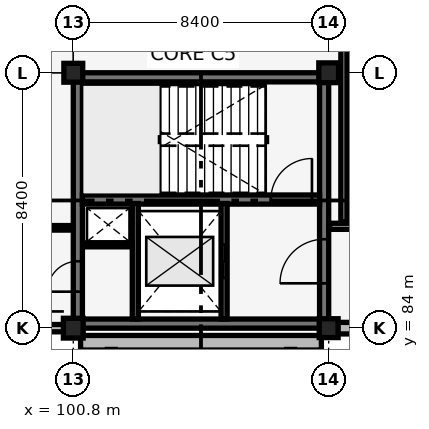
"""IFC4 building model, lengths in metres.
Left out: names, types, materials, properties, quantities, classifications, styles, units other than length and angle.
Written with IfcOpenShell. Run it as: python <this file> out.ifc"""

import sys

from ifc_helpers import new_model, si_unit, direction, frame, frame_2d, origin, origin_2d, place, context, subcontext, project, spatial, rectangle, extrude, element, fill, save


model = new_model("IFC4")
c1 = context("Model", 3, precision=1e-05, world=origin(), true_north=direction((0.0, 1.0)))
c2 = subcontext(c1, "Body", "Model", "MODEL_VIEW")
j1 = project(units=[si_unit("LENGTHUNIT", "METRE"), si_unit("PLANEANGLEUNIT", "RADIAN")], contexts=[c1])
p1 = place(None, origin())
s1 = spatial("IfcSite", under=j1, at=p1, CompositionType="ELEMENT")
p2 = place(p1, origin())
s2 = spatial("IfcBuilding", under=s1, at=p2, CompositionType="ELEMENT")
p3 = place(p2, frame((0.0, 0.0, 5.44)))
s3 = spatial("IfcBuildingStorey", under=s2, at=p3, CompositionType="ELEMENT", Elevation=5.44)
for number, where, z_axis, x_axis in (
    (1, (100.95, 84.15, 0.0), (0.0, 0.0, 1.0), (1.0, 0.0, 0.0)),
    (2, (100.95, 92.25, 0.0), (0.0, 0.0, 1.0), (1.0, 0.0, 0.0)),
):
    element("IfcWall", number, at=place(p3, frame(where, z_axis=z_axis, x_axis=x_axis)), inside=s3, PredefinedType="SHEAR", context=c2, shape_type="SweptSolid", body=[
        extrude(rectangle(XDim=8.1, YDim=0.3, at=frame_2d((4.05, 0.0))), origin(), (0.0, 0.0, 1.0), 4.12),
    ])
p4 = place(p3, frame((100.95, 84.15, 0.0), z_axis=(0.0, 0.0, 1.0), x_axis=(0.0, 1.0, 0.0)))
e3 = element("IfcWall", 3, at=p4, inside=s3, PredefinedType="SHEAR", context=c2, shape_type="SweptSolid", body=[
    extrude(rectangle(XDim=8.1, YDim=0.3, at=frame_2d((4.05, 0.0))), origin(), (0.0, 0.0, 1.0), 4.12),
])
p5 = place(p4, frame((1.05, 0.0, 0.0)))
e4 = element("IfcOpeningElement", 4, at=p5, cuts=e3, PredefinedType="OPENING", context=c2, shape_type="SweptSolid", body=[
    extrude(rectangle(XDim=1.0, YDim=2.15, at=frame_2d((0.5, 1.075))), frame((0.0, 0.16, 0.0), z_axis=(0.0, -1.0, 0.0), x_axis=(1.0, 0.0, 0.0)), (0.0, 0.0, 1.0), 0.32),
])
p6 = place(p3, frame((109.05, 84.15, 0.0), z_axis=(0.0, 0.0, 1.0), x_axis=(0.0, 1.0, 0.0)))
e5 = element("IfcWall", 5, at=p6, inside=s3, PredefinedType="SHEAR", context=c2, shape_type="SweptSolid", body=[
    extrude(rectangle(XDim=8.1, YDim=0.3, at=frame_2d((4.05, 0.0))), origin(), (0.0, 0.0, 1.0), 4.12),
])
p7 = place(p6, frame((1.325, 0.0, 0.0)))
e6 = element("IfcOpeningElement", 6, at=p7, cuts=e5, PredefinedType="OPENING", context=c2, shape_type="SweptSolid", body=[
    extrude(rectangle(XDim=1.45, YDim=2.15, at=frame_2d((0.725, 1.075))), frame((0.0, 0.16, 0.0), z_axis=(0.0, -1.0, 0.0), x_axis=(1.0, 0.0, 0.0)), (0.0, 0.0, 1.0), 0.32),
])
p8 = place(p3, frame((101.1, 88.23, 0.0), z_axis=(0.0, 0.0, 1.0), x_axis=(1.0, 0.0, 0.0)))
e7 = element("IfcWall", 7, at=p8, inside=s3, PredefinedType="SHEAR", context=c2, shape_type="SweptSolid", body=[
    extrude(rectangle(XDim=7.8, YDim=0.3, at=frame_2d((3.9, 0.0))), origin(), (0.0, 0.0, 1.0), 4.12),
])
p9 = place(p8, frame((6.2, 0.0, 0.0)))
e8 = element("IfcOpeningElement", 8, at=p9, cuts=e7, PredefinedType="OPENING", context=c2, shape_type="SweptSolid", body=[
    extrude(rectangle(XDim=1.35, YDim=2.15, at=frame_2d((0.675, 1.075))), frame((0.0, 0.16, 0.0), z_axis=(0.0, -1.0, 0.0), x_axis=(1.0, 0.0, 0.0)), (0.0, 0.0, 1.0), 0.32),
])
p10 = place(p3, frame((100.8, 84.0, 0.0), z_axis=(0.0, 0.0, 1.0), x_axis=(1.0, 0.0, 0.0)))
e9 = element("IfcColumn", 9, at=p10, inside=s3, PredefinedType="COLUMN", context=c2, shape_type="SweptSolid", body=[
    extrude(rectangle(XDim=0.65, YDim=0.65, at=origin_2d()), origin(), (0.0, 0.0, 1.0), 4.12),
])
for number, where, z_axis, x_axis in (
    (10, (100.8, 92.4, 0.0), (0.0, 0.0, 1.0), (1.0, 0.0, 0.0)),
    (11, (109.2, 84.0, 0.0), (0.0, 0.0, 1.0), (1.0, 0.0, 0.0)),
):
    element("IfcColumn", number, at=place(p3, frame(where, z_axis=z_axis, x_axis=x_axis)), inside=s3, PredefinedType="COLUMN", context=c2, shape_type="SweptSolid", body=[
        extrude(rectangle(XDim=0.62, YDim=0.62, at=origin_2d()), origin(), (0.0, 0.0, 1.0), 4.12),
    ])
p11 = place(p3, frame((109.2, 92.4, 0.0), z_axis=(0.0, 0.0, 1.0), x_axis=(1.0, 0.0, 0.0)))
e12 = element("IfcColumn", 12, at=p11, inside=s3, PredefinedType="COLUMN", context=c2, shape_type="SweptSolid", body=[
    extrude(rectangle(XDim=0.65, YDim=0.65, at=origin_2d()), origin(), (0.0, 0.0, 1.0), 4.12),
])
p12 = place(p3, frame((92.595, 84.0, 0.0), z_axis=(0.0, 0.0, 1.0), x_axis=(1.0, 0.0, 0.0)))
e13 = element("IfcWall", 13, at=p12, inside=s3, PredefinedType="SOLIDWALL", context=c2, shape_type="SweptSolid", body=[
    extrude(rectangle(XDim=7.895, YDim=0.24, at=frame_2d((3.948, 0.0))), origin(), (0.0, 0.0, 1.0), 3.38),
])
p13 = place(p12, frame((0.81, 0.0, 0.35)))
e14 = element("IfcOpeningElement", 14, at=p13, cuts=e13, PredefinedType="OPENING", context=c2, shape_type="SweptSolid", body=[
    extrude(rectangle(XDim=0.44, YDim=1.25, at=frame_2d((0.22, 0.625))), frame((0.0, 0.13, 0.0), z_axis=(0.0, -1.0, 0.0), x_axis=(1.0, 0.0, 0.0)), (0.0, 0.0, 1.0), 0.26),
])
p14 = place(p12, frame((2.269, 0.0, 0.35)))
e15 = element("IfcOpeningElement", 15, at=p14, cuts=e13, PredefinedType="OPENING", context=c2, shape_type="SweptSolid", body=[
    extrude(rectangle(XDim=0.44, YDim=1.25, at=frame_2d((0.22, 0.625))), frame((0.0, 0.13, 0.0), z_axis=(0.0, -1.0, 0.0), x_axis=(1.0, 0.0, 0.0)), (0.0, 0.0, 1.0), 0.26),
])
p15 = place(p12, frame((3.728, 0.0, 0.35)))
e16 = element("IfcOpeningElement", 16, at=p15, cuts=e13, PredefinedType="OPENING", context=c2, shape_type="SweptSolid", body=[
    extrude(rectangle(XDim=0.44, YDim=1.25, at=frame_2d((0.22, 0.625))), frame((0.0, 0.13, 0.0), z_axis=(0.0, -1.0, 0.0), x_axis=(1.0, 0.0, 0.0)), (0.0, 0.0, 1.0), 0.26),
])
p16 = place(p12, frame((5.187, 0.0, 0.35)))
e17 = element("IfcOpeningElement", 17, at=p16, cuts=e13, PredefinedType="OPENING", context=c2, shape_type="SweptSolid", body=[
    extrude(rectangle(XDim=0.44, YDim=1.25, at=frame_2d((0.22, 0.625))), frame((0.0, 0.13, 0.0), z_axis=(0.0, -1.0, 0.0), x_axis=(1.0, 0.0, 0.0)), (0.0, 0.0, 1.0), 0.26),
])
p17 = place(p12, frame((6.646, 0.0, 0.35)))
e18 = element("IfcOpeningElement", 18, at=p17, cuts=e13, PredefinedType="OPENING", context=c2, shape_type="SweptSolid", body=[
    extrude(rectangle(XDim=0.44, YDim=1.25, at=frame_2d((0.22, 0.625))), frame((0.0, 0.13, 0.0), z_axis=(0.0, -1.0, 0.0), x_axis=(1.0, 0.0, 0.0)), (0.0, 0.0, 1.0), 0.26),
])
p18 = place(p12, frame((0.81, 0.0, 1.8)))
e19 = element("IfcOpeningElement", 19, at=p18, cuts=e13, PredefinedType="OPENING", context=c2, shape_type="SweptSolid", body=[
    extrude(rectangle(XDim=0.44, YDim=1.25, at=frame_2d((0.22, 0.625))), frame((0.0, 0.13, 0.0), z_axis=(0.0, -1.0, 0.0), x_axis=(1.0, 0.0, 0.0)), (0.0, 0.0, 1.0), 0.26),
])
p19 = place(p12, frame((2.269, 0.0, 1.8)))
e20 = element("IfcOpeningElement", 20, at=p19, cuts=e13, PredefinedType="OPENING", context=c2, shape_type="SweptSolid", body=[
    extrude(rectangle(XDim=0.44, YDim=1.25, at=frame_2d((0.22, 0.625))), frame((0.0, 0.13, 0.0), z_axis=(0.0, -1.0, 0.0), x_axis=(1.0, 0.0, 0.0)), (0.0, 0.0, 1.0), 0.26),
])
p20 = place(p12, frame((3.728, 0.0, 1.8)))
e21 = element("IfcOpeningElement", 21, at=p20, cuts=e13, PredefinedType="OPENING", context=c2, shape_type="SweptSolid", body=[
    extrude(rectangle(XDim=0.44, YDim=1.25, at=frame_2d((0.22, 0.625))), frame((0.0, 0.13, 0.0), z_axis=(0.0, -1.0, 0.0), x_axis=(1.0, 0.0, 0.0)), (0.0, 0.0, 1.0), 0.26),
])
p21 = place(p12, frame((5.187, 0.0, 1.8)))
e22 = element("IfcOpeningElement", 22, at=p21, cuts=e13, PredefinedType="OPENING", context=c2, shape_type="SweptSolid", body=[
    extrude(rectangle(XDim=0.44, YDim=1.25, at=frame_2d((0.22, 0.625))), frame((0.0, 0.13, 0.0), z_axis=(0.0, -1.0, 0.0), x_axis=(1.0, 0.0, 0.0)), (0.0, 0.0, 1.0), 0.26),
])
p22 = place(p12, frame((6.646, 0.0, 1.8)))
e23 = element("IfcOpeningElement", 23, at=p22, cuts=e13, PredefinedType="OPENING", context=c2, shape_type="SweptSolid", body=[
    extrude(rectangle(XDim=0.44, YDim=1.25, at=frame_2d((0.22, 0.625))), frame((0.0, 0.13, 0.0), z_axis=(0.0, -1.0, 0.0), x_axis=(1.0, 0.0, 0.0)), (0.0, 0.0, 1.0), 0.26),
])
p23 = place(p3, frame((101.04, 83.52, 0.0), z_axis=(0.0, 0.0, 1.0), x_axis=(1.0, 0.0, 0.0)))
e24 = element("IfcWall", 24, at=p23, inside=s3, PredefinedType="SOLIDWALL", context=c2, shape_type="SweptSolid", body=[
    extrude(rectangle(XDim=7.92, YDim=0.48, at=frame_2d((3.96, 0.0))), origin(), (0.0, 0.0, 1.0), 4.42),
])
p24 = place(p3, frame((109.495, 84.0, 0.0), z_axis=(0.0, 0.0, 1.0), x_axis=(1.0, 0.0, 0.0)))
e25 = element("IfcWall", 25, at=p24, inside=s3, PredefinedType="SOLIDWALL", context=c2, shape_type="SweptSolid", body=[
    extrude(rectangle(XDim=7.795, YDim=0.38, at=frame_2d((3.897, 0.0))), origin(), (0.0, 0.0, 1.0), 3.38),
])
p25 = place(p24, frame((1.071, 0.0, 0.7)))
e26 = element("IfcOpeningElement", 26, at=p25, cuts=e25, PredefinedType="OPENING", context=c2, shape_type="SweptSolid", body=[
    extrude(rectangle(XDim=0.82, YDim=2.4, at=frame_2d((0.41, 1.2))), frame((0.0, 0.2, 0.0), z_axis=(0.0, -1.0, 0.0), x_axis=(1.0, 0.0, 0.0)), (0.0, 0.0, 1.0), 0.4),
])
p26 = place(p24, frame((2.63, 0.0, 0.7)))
e27 = element("IfcOpeningElement", 27, at=p26, cuts=e25, PredefinedType="OPENING", context=c2, shape_type="SweptSolid", body=[
    extrude(rectangle(XDim=0.82, YDim=2.4, at=frame_2d((0.41, 1.2))), frame((0.0, 0.2, 0.0), z_axis=(0.0, -1.0, 0.0), x_axis=(1.0, 0.0, 0.0)), (0.0, 0.0, 1.0), 0.4),
])
p27 = place(p24, frame((4.345, 0.0, 0.7)))
e28 = element("IfcOpeningElement", 28, at=p27, cuts=e25, PredefinedType="OPENING", context=c2, shape_type="SweptSolid", body=[
    extrude(rectangle(XDim=0.82, YDim=2.4, at=frame_2d((0.41, 1.2))), frame((0.0, 0.2, 0.0), z_axis=(0.0, -1.0, 0.0), x_axis=(1.0, 0.0, 0.0)), (0.0, 0.0, 1.0), 0.4),
])
p28 = place(p24, frame((5.904, 0.0, 0.7)))
e29 = element("IfcOpeningElement", 29, at=p28, cuts=e25, PredefinedType="OPENING", context=c2, shape_type="SweptSolid", body=[
    extrude(rectangle(XDim=0.82, YDim=2.4, at=frame_2d((0.41, 1.2))), frame((0.0, 0.2, 0.0), z_axis=(0.0, -1.0, 0.0), x_axis=(1.0, 0.0, 0.0)), (0.0, 0.0, 1.0), 0.4),
])
p29 = place(p3, frame((105.76, 84.3, 0.0), z_axis=(0.0, 0.0, 1.0), x_axis=(0.0, 1.0, 0.0)))
e30 = element("IfcWall", 30, at=p29, inside=s3, PredefinedType="SHEAR", context=c2, shape_type="SweptSolid", body=[
    extrude(rectangle(XDim=3.8, YDim=0.2, at=frame_2d((1.9, 0.0))), origin(), (0.0, 0.0, 1.0), 3.38),
])
p30 = place(p29, frame((1.35, 0.0, 0.0)))
e31 = element("IfcOpeningElement", 31, at=p30, cuts=e30, PredefinedType="OPENING", context=c2, shape_type="SweptSolid", body=[
    extrude(rectangle(XDim=1.1, YDim=2.15, at=frame_2d((0.55, 1.075))), frame((0.0, 0.11, 0.0), z_axis=(0.0, -1.0, 0.0), x_axis=(1.0, 0.0, 0.0)), (0.0, 0.0, 1.0), 0.22),
])
p31 = place(p3, frame((102.84, 84.3, 0.0), z_axis=(0.0, 0.0, 1.0), x_axis=(0.0, 1.0, 0.0)))
e32 = element("IfcWall", 32, at=p31, inside=s3, PredefinedType="SHEAR", context=c2, shape_type="SweptSolid", body=[
    extrude(rectangle(XDim=3.8, YDim=0.2, at=frame_2d((1.9, 0.0))), origin(), (0.0, 0.0, 1.0), 3.38),
])
p32 = place(p3, frame((101.12, 86.74, 0.0), z_axis=(0.0, 0.0, 1.0), x_axis=(1.0, 0.0, 0.0)))
e33 = element("IfcWall", 33, at=p32, inside=s3, PredefinedType="PARTITIONING", context=c2, shape_type="SweptSolid", body=[
    extrude(rectangle(XDim=1.62, YDim=0.13, at=frame_2d((0.81, 0.0))), origin(), (0.0, 0.0, 1.0), 4.12),
])
p33 = place(p3, frame((75.58, 87.3, 0.0), z_axis=(0.0, 0.0, 1.0), x_axis=(1.0, 0.0, 0.0)))
e34 = element("IfcWall", 34, at=p33, inside=s3, PredefinedType="PARTITIONING", context=c2, shape_type="SweptSolid", body=[
    extrude(rectangle(XDim=25.19, YDim=0.15, at=frame_2d((12.595, 0.0))), origin(), (0.0, 0.0, 1.0), 3.47),
])
p34 = place(p33, frame((12.07, 0.0, 0.0)))
e35 = element("IfcOpeningElement", 35, at=p34, cuts=e34, PredefinedType="OPENING", context=c2, shape_type="SweptSolid", body=[
    extrude(rectangle(XDim=1.05, YDim=2.15, at=frame_2d((0.525, 1.075))), frame((0.0, 0.085, 0.0), z_axis=(0.0, -1.0, 0.0), x_axis=(1.0, 0.0, 0.0)), (0.0, 0.0, 1.0), 0.17),
])
p35 = place(p3, frame((109.23, 87.35, 0.0), z_axis=(0.0, 0.0, 1.0), x_axis=(1.0, 0.0, 0.0)))
e36 = element("IfcWall", 36, at=p35, inside=s3, PredefinedType="PARTITIONING", context=c2, shape_type="SweptSolid", body=[
    extrude(rectangle(XDim=16.74, YDim=0.2, at=frame_2d((8.37, 0.0))), origin(), (0.0, 0.0, 1.0), 3.47),
])
p36 = place(p35, frame((7.62, 0.0, 0.0)))
e37 = element("IfcOpeningElement", 37, at=p36, cuts=e36, PredefinedType="OPENING", context=c2, shape_type="SweptSolid", body=[
    extrude(rectangle(XDim=1.5, YDim=2.2, at=frame_2d((0.75, 1.1))), frame((0.0, 0.11, 0.0), z_axis=(0.0, -1.0, 0.0), x_axis=(1.0, 0.0, 0.0)), (0.0, 0.0, 1.0), 0.22),
])
p37 = place(p3, frame((109.7, 87.5, 0.0), z_axis=(0.0, 0.0, 1.0), x_axis=(0.0, 1.0, 0.0)))
e38 = element("IfcWall", 38, at=p37, inside=s3, PredefinedType="PARTITIONING", context=c2, shape_type="SweptSolid", body=[
    extrude(rectangle(XDim=29.92, YDim=0.2, at=frame_2d((14.96, 0.0))), origin(), (0.0, 0.0, 1.0), 3.34),
])
p38 = place(p9, origin())
e39 = element("IfcDoor", 39, at=p38, inside=s3, OperationType="SINGLE_SWING_RIGHT", PredefinedType="DOOR", context=c2, shape_type="SweptSolid", body=[
    extrude(rectangle(XDim=1.35, YDim=2.15, at=frame_2d((0.675, 1.075))), frame((0.0, 0.025, 0.0), z_axis=(0.0, -1.0, 0.0), x_axis=(1.0, 0.0, 0.0)), (0.0, 0.0, 1.0), 0.05),
])
fill(e8, e39)
p39 = place(p30, origin())
e40 = element("IfcDoor", 40, at=p39, inside=s3, OperationType="SLIDING_TO_LEFT", PredefinedType="DOOR", context=c2, shape_type="SweptSolid", body=[
    extrude(rectangle(XDim=1.1, YDim=2.15, at=frame_2d((0.55, 1.075))), frame((0.0, 0.025, 0.0), z_axis=(0.0, -1.0, 0.0), x_axis=(1.0, 0.0, 0.0)), (0.0, 0.0, 1.0), 0.05),
])
fill(e31, e40)
p40 = place(p7, origin())
e41 = element("IfcDoor", 41, at=p40, inside=s3, OperationType="DOUBLE_DOOR_SINGLE_SWING", PredefinedType="DOOR", context=c2, shape_type="SweptSolid", body=[
    extrude(rectangle(XDim=1.45, YDim=2.15, at=frame_2d((0.725, 1.075))), frame((0.0, 0.025, 0.0), z_axis=(0.0, -1.0, 0.0), x_axis=(1.0, 0.0, 0.0)), (0.0, 0.0, 1.0), 0.05),
])
fill(e6, e41)
p41 = place(p5, origin())
e42 = element("IfcDoor", 42, at=p41, inside=s3, OperationType="SINGLE_SWING_LEFT", PredefinedType="DOOR", context=c2, shape_type="SweptSolid", body=[
    extrude(rectangle(XDim=1.0, YDim=2.15, at=frame_2d((0.5, 1.075))), frame((0.0, 0.025, 0.0), z_axis=(0.0, -1.0, 0.0), x_axis=(1.0, 0.0, 0.0)), (0.0, 0.0, 1.0), 0.05),
])
fill(e4, e42)
save(model, sys.argv[1])
